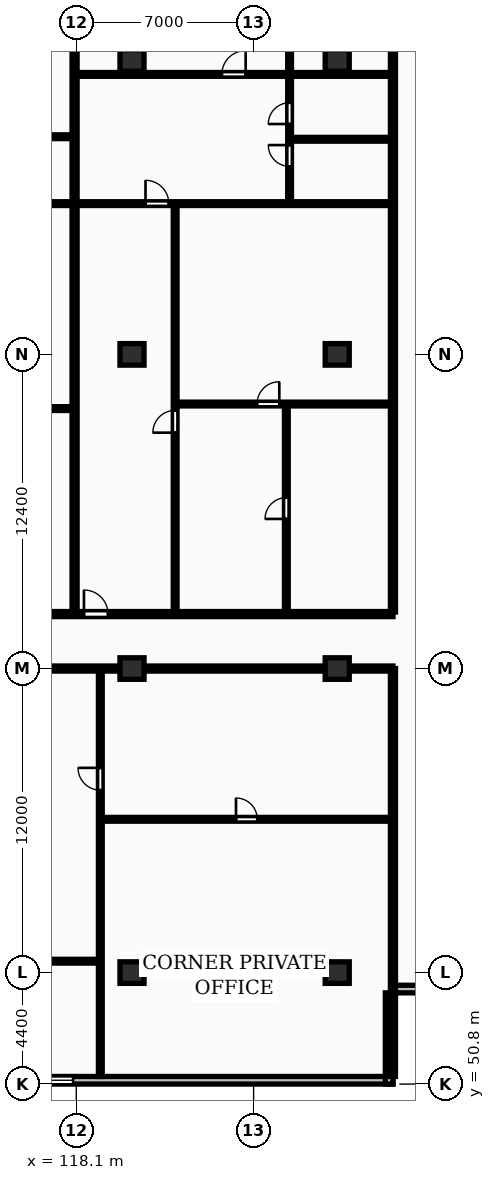
"""IFC4 building model, lengths in metres.
Left out: names, types, materials, properties, quantities, classifications, styles, units other than length and angle.
Written with IfcOpenShell. Run it as: python <this file> out.ifc"""

import sys

from ifc_helpers import new_model, si_unit, direction, frame, frame_2d, origin, origin_2d, place, context, subcontext, project, spatial, rectangle, extrude, element, fill, save


model = new_model("IFC4")
c1 = context("Model", 3, precision=1e-05, world=origin(), true_north=direction((0.0, 1.0)))
c2 = subcontext(c1, "Body", "Model", "MODEL_VIEW")
j1 = project(units=[si_unit("LENGTHUNIT", "METRE"), si_unit("PLANEANGLEUNIT", "RADIAN")], contexts=[c1])
p1 = place(None, origin())
s1 = spatial("IfcSite", under=j1, at=p1, CompositionType="ELEMENT")
p2 = place(p1, origin())
s2 = spatial("IfcBuilding", under=s1, at=p2, CompositionType="ELEMENT")
p3 = place(p2, frame((0.0, 0.0, 87.3)))
s3 = spatial("IfcBuildingStorey", under=s2, at=p3, CompositionType="ELEMENT", Elevation=87.3)
for number, where, z_axis, x_axis in (
    (1, (120.3, 55.2, 0.0), (0.0, 0.0, 1.0), (1.0, 0.0, 0.0)),
    (2, (120.3, 67.2, 0.0), (0.0, 0.0, 1.0), (1.0, 0.0, 0.0)),
    (3, (120.3, 79.6, 0.0), (0.0, 0.0, 1.0), (1.0, 0.0, 0.0)),
    (4, (120.3, 91.2, 0.0), (0.0, 0.0, 1.0), (1.0, 0.0, 0.0)),
    (5, (128.4, 55.2, 0.0), (0.0, 0.0, 1.0), (1.0, 0.0, 0.0)),
    (6, (128.4, 67.2, 0.0), (0.0, 0.0, 1.0), (1.0, 0.0, 0.0)),
    (7, (128.4, 79.6, 0.0), (0.0, 0.0, 1.0), (1.0, 0.0, 0.0)),
    (8, (128.4, 91.2, 0.0), (0.0, 0.0, 1.0), (1.0, 0.0, 0.0)),
):
    element("IfcColumn", number, at=place(p3, frame(where, z_axis=z_axis, x_axis=x_axis)), inside=s3, PredefinedType="COLUMN", context=c2, shape_type="SweptSolid", body=[
        extrude(rectangle(XDim=0.95, YDim=0.85, at=origin_2d()), origin(), (0.0, 0.0, 1.0), 3.25),
    ])
p4 = place(p3, frame((57.6, 50.95, 0.0), z_axis=(0.0, 0.0, 1.0), x_axis=(1.0, 0.0, 0.0)))
e9 = element("IfcWall", 9, at=p4, inside=s3, PredefinedType="STANDARD", context=c2, shape_type="SweptSolid", body=[
    extrude(rectangle(XDim=73.0, YDim=0.3, at=frame_2d((36.5, 0.0))), origin(), (0.0, 0.0, 1.0), 2.97),
])
p5 = place(p4, frame((15.225, 0.0, 0.85)))
e10 = element("IfcOpeningElement", 10, at=p5, cuts=e9, PredefinedType="OPENING", context=c2, shape_type="SweptSolid", body=[
    extrude(rectangle(XDim=1.8, YDim=1.8, at=frame_2d((0.9, 0.9))), frame((0.0, 0.16, 0.0), z_axis=(0.0, -1.0, 0.0), x_axis=(1.0, 0.0, 0.0)), (0.0, 0.0, 1.0), 0.32),
])
p6 = place(p4, frame((58.575, 0.0, 0.85)))
e11 = element("IfcOpeningElement", 11, at=p6, cuts=e9, PredefinedType="OPENING", context=c2, shape_type="SweptSolid", body=[
    extrude(rectangle(XDim=1.8, YDim=1.8, at=frame_2d((0.9, 0.9))), frame((0.0, 0.16, 0.0), z_axis=(0.0, -1.0, 0.0), x_axis=(1.0, 0.0, 0.0)), (0.0, 0.0, 1.0), 0.32),
])
for number, where, z_axis, x_axis in (
    (12, (130.45, 50.8, 0.0), (0.0, 0.0, 1.0), (0.0, 1.0, 0.0)),
    (13, (130.6, 54.55, 0.0), (0.0, 0.0, 1.0), (1.0, 0.0, 0.0)),
):
    element("IfcWall", number, at=place(p3, frame(where, z_axis=z_axis, x_axis=x_axis)), inside=s3, PredefinedType="STANDARD", context=c2, shape_type="SweptSolid", body=[
        extrude(rectangle(XDim=3.6, YDim=0.3, at=frame_2d((1.8, 0.0))), origin(), (0.0, 0.0, 1.0), 2.97),
    ])
p7 = place(p3, frame((130.6, 51.1, 0.0), z_axis=(0.0, 0.0, 1.0), x_axis=(0.0, 1.0, 0.0)))
e14 = element("IfcWall", 14, at=p7, inside=s3, PredefinedType="PARTITIONING", context=c2, shape_type="SweptSolid", body=[
    extrude(rectangle(XDim=16.1, YDim=0.2, at=frame_2d((8.05, 0.0))), origin(), (0.0, 0.0, 1.0), 2.97),
])
p8 = place(p3, frame((119.05, 61.25, 0.0), z_axis=(0.0, 0.0, 1.0), x_axis=(1.0, 0.0, 0.0)))
e15 = element("IfcWall", 15, at=p8, inside=s3, PredefinedType="PARTITIONING", context=c2, shape_type="SweptSolid", body=[
    extrude(rectangle(XDim=11.55, YDim=0.15, at=frame_2d((5.775, 0.0))), origin(), (0.0, 0.0, 1.0), 2.97),
])
p9 = place(p8, frame((5.355, 0.0, 0.0)))
e16 = element("IfcOpeningElement", 16, at=p9, cuts=e15, PredefinedType="OPENING", context=c2, shape_type="SweptSolid", body=[
    extrude(rectangle(XDim=0.84, YDim=2.04, at=frame_2d((0.42, 1.02))), frame((0.0, 0.085, 0.0), z_axis=(0.0, -1.0, 0.0), x_axis=(1.0, 0.0, 0.0)), (0.0, 0.0, 1.0), 0.17),
])
p10 = place(p3, frame((119.05, 51.1, 0.0), z_axis=(0.0, 0.0, 1.0), x_axis=(0.0, 1.0, 0.0)))
e17 = element("IfcWall", 17, at=p10, inside=s3, PredefinedType="PARTITIONING", context=c2, shape_type="SweptSolid", body=[
    extrude(rectangle(XDim=16.05, YDim=0.15, at=frame_2d((8.025, 0.0))), origin(), (0.0, 0.0, 1.0), 2.97),
])
p11 = place(p10, frame((11.3, 0.0, 0.0)))
e18 = element("IfcOpeningElement", 18, at=p11, cuts=e17, PredefinedType="OPENING", context=c2, shape_type="SweptSolid", body=[
    extrude(rectangle(XDim=0.88, YDim=2.06, at=frame_2d((0.44, 1.03))), frame((0.0, 0.085, 0.0), z_axis=(0.0, -1.0, 0.0), x_axis=(1.0, 0.0, 0.0)), (0.0, 0.0, 1.0), 0.17),
])
p12 = place(p3, frame((112.27, 55.65, 0.0), z_axis=(0.0, 0.0, 1.0), x_axis=(1.0, 0.0, 0.0)))
e19 = element("IfcWall", 19, at=p12, inside=s3, PredefinedType="PARTITIONING", context=c2, shape_type="SweptSolid", body=[
    extrude(rectangle(XDim=6.76, YDim=0.15, at=frame_2d((3.38, 0.0))), origin(), (0.0, 0.0, 1.0), 2.97),
])
p13 = place(p12, frame((1.64, 0.0, 0.0)))
e20 = element("IfcOpeningElement", 20, at=p13, cuts=e19, PredefinedType="OPENING", context=c2, shape_type="SweptSolid", body=[
    extrude(rectangle(XDim=0.84, YDim=2.04, at=frame_2d((0.42, 1.02))), frame((0.0, 0.085, 0.0), z_axis=(0.0, -1.0, 0.0), x_axis=(1.0, 0.0, 0.0)), (0.0, 0.0, 1.0), 0.17),
])
p14 = place(p12, frame((3.16, 0.0, 0.0)))
e21 = element("IfcOpeningElement", 21, at=p14, cuts=e19, PredefinedType="OPENING", context=c2, shape_type="SweptSolid", body=[
    extrude(rectangle(XDim=0.88, YDim=2.06, at=frame_2d((0.44, 1.03))), frame((0.0, 0.085, 0.0), z_axis=(0.0, -1.0, 0.0), x_axis=(1.0, 0.0, 0.0)), (0.0, 0.0, 1.0), 0.17),
])
p15 = place(p3, frame((112.25, 67.2, 0.0), z_axis=(0.0, 0.0, 1.0), x_axis=(1.0, 0.0, 0.0)))
e22 = element("IfcWall", 22, at=p15, inside=s3, PredefinedType="PARTITIONING", context=c2, shape_type="SweptSolid", body=[
    extrude(rectangle(XDim=18.35, YDim=0.2, at=frame_2d((9.175, 0.0))), origin(), (0.0, 0.0, 1.0), 2.433),
])
p16 = place(p15, frame((1.58, 0.0, 0.0)))
e23 = element("IfcOpeningElement", 23, at=p16, cuts=e22, PredefinedType="OPENING", context=c2, shape_type="SweptSolid", body=[
    extrude(rectangle(XDim=0.95, YDim=2.15, at=frame_2d((0.475, 1.075))), frame((0.0, 0.11, 0.0), z_axis=(0.0, -1.0, 0.0), x_axis=(1.0, 0.0, 0.0)), (0.0, 0.0, 1.0), 0.22),
])
for number, where, z_axis, x_axis in (
    (24, (130.6, 69.43, 0.0), (0.0, 0.0, 1.0), (0.0, 1.0, 0.0)),
    (25, (118.033, 69.43, 0.0), (0.0, 0.0, 1.0), (0.0, 1.0, 0.0)),
):
    element("IfcWall", number, at=place(p3, frame(where, z_axis=z_axis, x_axis=x_axis)), inside=s3, PredefinedType="PARTITIONING", context=c2, shape_type="SweptSolid", body=[
        extrude(rectangle(XDim=26.47, YDim=0.2, at=frame_2d((13.235, 0.0))), origin(), (0.0, 0.0, 1.0), 2.97),
    ])
p17 = place(p3, frame((105.017, 77.46, 0.0), z_axis=(0.0, 0.0, 1.0), x_axis=(1.0, 0.0, 0.0)))
e26 = element("IfcWall", 26, at=p17, inside=s3, PredefinedType="PARTITIONING", context=c2, shape_type="SweptSolid", body=[
    extrude(rectangle(XDim=12.936, YDim=0.15, at=frame_2d((6.468, 0.0))), origin(), (0.0, 0.0, 1.0), 2.97),
])
p18 = place(p17, frame((4.464, 0.0, 0.0)))
e27 = element("IfcOpeningElement", 27, at=p18, cuts=e26, PredefinedType="OPENING", context=c2, shape_type="SweptSolid", body=[
    extrude(rectangle(XDim=0.88, YDim=2.06, at=frame_2d((0.44, 1.03))), frame((0.0, 0.085, 0.0), z_axis=(0.0, -1.0, 0.0), x_axis=(1.0, 0.0, 0.0)), (0.0, 0.0, 1.0), 0.17),
])
p19 = place(p3, frame((106.027, 88.19, 0.0), z_axis=(0.0, 0.0, 1.0), x_axis=(1.0, 0.0, 0.0)))
e28 = element("IfcWall", 28, at=p19, inside=s3, PredefinedType="PARTITIONING", context=c2, shape_type="SweptSolid", body=[
    extrude(rectangle(XDim=11.926, YDim=0.15, at=frame_2d((5.963, 0.0))), origin(), (0.0, 0.0, 1.0), 2.97),
])
p20 = place(p19, frame((1.05, 0.0, 0.0)))
e29 = element("IfcOpeningElement", 29, at=p20, cuts=e28, PredefinedType="OPENING", context=c2, shape_type="SweptSolid", body=[
    extrude(rectangle(XDim=0.84, YDim=2.04, at=frame_2d((0.42, 1.02))), frame((0.0, 0.085, 0.0), z_axis=(0.0, -1.0, 0.0), x_axis=(1.0, 0.0, 0.0)), (0.0, 0.0, 1.0), 0.17),
])
p21 = place(p19, frame((5.543, 0.0, 0.0)))
e30 = element("IfcOpeningElement", 30, at=p21, cuts=e28, PredefinedType="OPENING", context=c2, shape_type="SweptSolid", body=[
    extrude(rectangle(XDim=0.84, YDim=2.04, at=frame_2d((0.42, 1.02))), frame((0.0, 0.085, 0.0), z_axis=(0.0, -1.0, 0.0), x_axis=(1.0, 0.0, 0.0)), (0.0, 0.0, 1.0), 0.17),
])
p22 = place(p19, frame((8.203, 0.0, 0.0)))
e31 = element("IfcOpeningElement", 31, at=p22, cuts=e28, PredefinedType="OPENING", context=c2, shape_type="SweptSolid", body=[
    extrude(rectangle(XDim=0.84, YDim=2.04, at=frame_2d((0.42, 1.02))), frame((0.0, 0.085, 0.0), z_axis=(0.0, -1.0, 0.0), x_axis=(1.0, 0.0, 0.0)), (0.0, 0.0, 1.0), 0.17),
])
p23 = place(p3, frame((101.067, 85.55, 0.0), z_axis=(0.0, 0.0, 1.0), x_axis=(1.0, 0.0, 0.0)))
e32 = element("IfcWall", 32, at=p23, inside=s3, PredefinedType="PARTITIONING", context=c2, shape_type="SweptSolid", body=[
    extrude(rectangle(XDim=16.886, YDim=0.15, at=frame_2d((8.443, 0.0))), origin(), (0.0, 0.0, 1.0), 2.97),
])
p24 = place(p23, frame((2.72, 0.0, 0.0)))
e33 = element("IfcOpeningElement", 33, at=p24, cuts=e32, PredefinedType="OPENING", context=c2, shape_type="SweptSolid", body=[
    extrude(rectangle(XDim=0.92, YDim=2.08, at=frame_2d((0.46, 1.04))), frame((0.0, 0.085, 0.0), z_axis=(0.0, -1.0, 0.0), x_axis=(1.0, 0.0, 0.0)), (0.0, 0.0, 1.0), 0.17),
])
p25 = place(p3, frame((126.392, 69.41, 0.0), z_axis=(0.0, 0.0, 1.0), x_axis=(0.0, 1.0, 0.0)))
e34 = element("IfcWall", 34, at=p25, inside=s3, PredefinedType="PARTITIONING", context=c2, shape_type="SweptSolid", body=[
    extrude(rectangle(XDim=8.23, YDim=0.15, at=frame_2d((4.115, 0.0))), origin(), (0.0, 0.0, 1.0), 2.97),
])
p26 = place(p25, frame((3.695, 0.0, 0.0)))
e35 = element("IfcOpeningElement", 35, at=p26, cuts=e34, PredefinedType="OPENING", context=c2, shape_type="SweptSolid", body=[
    extrude(rectangle(XDim=0.84, YDim=2.04, at=frame_2d((0.42, 1.02))), frame((0.0, 0.085, 0.0), z_axis=(0.0, -1.0, 0.0), x_axis=(1.0, 0.0, 0.0)), (0.0, 0.0, 1.0), 0.17),
])
p27 = place(p3, frame((122.063, 77.64, 0.0), z_axis=(0.0, 0.0, 1.0), x_axis=(1.0, 0.0, 0.0)))
e36 = element("IfcWall", 36, at=p27, inside=s3, PredefinedType="PARTITIONING", context=c2, shape_type="SweptSolid", body=[
    extrude(rectangle(XDim=8.457, YDim=0.15, at=frame_2d((4.228, 0.0))), origin(), (0.0, 0.0, 1.0), 2.97),
])
p28 = place(p27, frame((3.171, 0.0, 0.0)))
e37 = element("IfcOpeningElement", 37, at=p28, cuts=e36, PredefinedType="OPENING", context=c2, shape_type="SweptSolid", body=[
    extrude(rectangle(XDim=0.88, YDim=2.06, at=frame_2d((0.44, 1.03))), frame((0.0, 0.085, 0.0), z_axis=(0.0, -1.0, 0.0), x_axis=(1.0, 0.0, 0.0)), (0.0, 0.0, 1.0), 0.17),
])
p29 = place(p3, frame((122.003, 69.41, 0.0), z_axis=(0.0, 0.0, 1.0), x_axis=(0.0, 1.0, 0.0)))
e38 = element("IfcWall", 38, at=p29, inside=s3, PredefinedType="PARTITIONING", context=c2, shape_type="SweptSolid", body=[
    extrude(rectangle(XDim=16.1, YDim=0.15, at=frame_2d((8.05, 0.0))), origin(), (0.0, 0.0, 1.0), 2.97),
])
p30 = place(p29, frame((7.1, 0.0, 0.0)))
e39 = element("IfcOpeningElement", 39, at=p30, cuts=e38, PredefinedType="OPENING", context=c2, shape_type="SweptSolid", body=[
    extrude(rectangle(XDim=0.88, YDim=2.06, at=frame_2d((0.44, 1.03))), frame((0.0, 0.085, 0.0), z_axis=(0.0, -1.0, 0.0), x_axis=(1.0, 0.0, 0.0)), (0.0, 0.0, 1.0), 0.17),
])
p31 = place(p3, frame((126.58, 88.09, 0.0), z_axis=(0.0, 0.0, 1.0), x_axis=(1.0, 0.0, 0.0)))
e40 = element("IfcWall", 40, at=p31, inside=s3, PredefinedType="PARTITIONING", context=c2, shape_type="SweptSolid", body=[
    extrude(rectangle(XDim=3.94, YDim=0.15, at=frame_2d((1.97, 0.0))), origin(), (0.0, 0.0, 1.0), 2.97),
])
p32 = place(p3, frame((126.52, 85.59, 0.0), z_axis=(0.0, 0.0, 1.0), x_axis=(0.0, 1.0, 0.0)))
e41 = element("IfcWall", 41, at=p32, inside=s3, PredefinedType="PARTITIONING", context=c2, shape_type="SweptSolid", body=[
    extrude(rectangle(XDim=10.31, YDim=0.15, at=frame_2d((5.155, 0.0))), origin(), (0.0, 0.0, 1.0), 2.97),
])
p33 = place(p32, frame((1.43, 0.0, 0.0)))
e42 = element("IfcOpeningElement", 42, at=p33, cuts=e41, PredefinedType="OPENING", context=c2, shape_type="SweptSolid", body=[
    extrude(rectangle(XDim=0.84, YDim=2.04, at=frame_2d((0.42, 1.02))), frame((0.0, 0.085, 0.0), z_axis=(0.0, -1.0, 0.0), x_axis=(1.0, 0.0, 0.0)), (0.0, 0.0, 1.0), 0.17),
])
p34 = place(p32, frame((3.102, 0.0, 0.0)))
e43 = element("IfcOpeningElement", 43, at=p34, cuts=e41, PredefinedType="OPENING", context=c2, shape_type="SweptSolid", body=[
    extrude(rectangle(XDim=0.84, YDim=2.04, at=frame_2d((0.42, 1.02))), frame((0.0, 0.085, 0.0), z_axis=(0.0, -1.0, 0.0), x_axis=(1.0, 0.0, 0.0)), (0.0, 0.0, 1.0), 0.17),
])
p35 = place(p32, frame((7.29, 0.0, 0.0)))
e44 = element("IfcOpeningElement", 44, at=p35, cuts=e41, PredefinedType="OPENING", context=c2, shape_type="SweptSolid", body=[
    extrude(rectangle(XDim=0.88, YDim=2.06, at=frame_2d((0.44, 1.03))), frame((0.0, 0.085, 0.0), z_axis=(0.0, -1.0, 0.0), x_axis=(1.0, 0.0, 0.0)), (0.0, 0.0, 1.0), 0.17),
])
p36 = place(p3, frame((118.113, 85.55, 0.0), z_axis=(0.0, 0.0, 1.0), x_axis=(1.0, 0.0, 0.0)))
e45 = element("IfcWall", 45, at=p36, inside=s3, PredefinedType="PARTITIONING", context=c2, shape_type="SweptSolid", body=[
    extrude(rectangle(XDim=12.407, YDim=0.15, at=frame_2d((6.203, 0.0))), origin(), (0.0, 0.0, 1.0), 2.97),
])
p37 = place(p36, frame((2.72, 0.0, 0.0)))
e46 = element("IfcOpeningElement", 46, at=p37, cuts=e45, PredefinedType="OPENING", context=c2, shape_type="SweptSolid", body=[
    extrude(rectangle(XDim=0.92, YDim=2.08, at=frame_2d((0.46, 1.04))), frame((0.0, 0.085, 0.0), z_axis=(0.0, -1.0, 0.0), x_axis=(1.0, 0.0, 0.0)), (0.0, 0.0, 1.0), 0.17),
])
p38 = place(p3, frame((118.113, 90.65, 0.0), z_axis=(0.0, 0.0, 1.0), x_axis=(1.0, 0.0, 0.0)))
e47 = element("IfcWall", 47, at=p38, inside=s3, PredefinedType="PARTITIONING", context=c2, shape_type="SweptSolid", body=[
    extrude(rectangle(XDim=12.407, YDim=0.15, at=frame_2d((6.203, 0.0))), origin(), (0.0, 0.0, 1.0), 2.97),
])
p39 = place(p38, frame((5.733, 0.0, 0.0)))
e48 = element("IfcOpeningElement", 48, at=p39, cuts=e47, PredefinedType="OPENING", context=c2, shape_type="SweptSolid", body=[
    extrude(rectangle(XDim=0.94, YDim=2.1, at=frame_2d((0.47, 1.05))), frame((0.0, 0.085, 0.0), z_axis=(0.0, -1.0, 0.0), x_axis=(1.0, 0.0, 0.0)), (0.0, 0.0, 1.0), 0.17),
])
p40 = place(p3, frame((57.6, 69.35, 0.0), z_axis=(0.0, 0.0, 1.0), x_axis=(1.0, 0.0, 0.0)))
e49 = element("IfcWall", 49, at=p40, inside=s3, PredefinedType="PARTITIONING", context=c2, shape_type="SweptSolid", body=[
    extrude(rectangle(XDim=73.0, YDim=0.2, at=frame_2d((36.5, 0.0))), origin(), (0.0, 0.0, 1.0), 2.97),
])
p41 = place(p40, frame((0.37, 0.0, 0.0)))
e50 = element("IfcOpeningElement", 50, at=p41, cuts=e49, PredefinedType="OPENING", context=c2, shape_type="SweptSolid", body=[
    extrude(rectangle(XDim=0.95, YDim=2.15, at=frame_2d((0.475, 1.075))), frame((0.0, 0.11, 0.0), z_axis=(0.0, -1.0, 0.0), x_axis=(1.0, 0.0, 0.0)), (0.0, 0.0, 1.0), 0.22),
])
p42 = place(p40, frame((20.421, 0.0, 0.0)))
e51 = element("IfcOpeningElement", 51, at=p42, cuts=e49, PredefinedType="OPENING", context=c2, shape_type="SweptSolid", body=[
    extrude(rectangle(XDim=1.22, YDim=2.18, at=frame_2d((0.61, 1.09))), frame((0.0, 0.11, 0.0), z_axis=(0.0, -1.0, 0.0), x_axis=(1.0, 0.0, 0.0)), (0.0, 0.0, 1.0), 0.22),
])
p43 = place(p40, frame((32.729, 0.0, 0.0)))
e52 = element("IfcOpeningElement", 52, at=p43, cuts=e49, PredefinedType="OPENING", context=c2, shape_type="SweptSolid", body=[
    extrude(rectangle(XDim=0.95, YDim=2.15, at=frame_2d((0.475, 1.075))), frame((0.0, 0.11, 0.0), z_axis=(0.0, -1.0, 0.0), x_axis=(1.0, 0.0, 0.0)), (0.0, 0.0, 1.0), 0.22),
])
p44 = place(p40, frame((46.157, 0.0, 0.0)))
e53 = element("IfcOpeningElement", 53, at=p44, cuts=e49, PredefinedType="OPENING", context=c2, shape_type="SweptSolid", body=[
    extrude(rectangle(XDim=0.95, YDim=2.15, at=frame_2d((0.475, 1.075))), frame((0.0, 0.11, 0.0), z_axis=(0.0, -1.0, 0.0), x_axis=(1.0, 0.0, 0.0)), (0.0, 0.0, 1.0), 0.22),
])
p45 = place(p40, frame((60.803, 0.0, 0.0)))
e54 = element("IfcOpeningElement", 54, at=p45, cuts=e49, PredefinedType="OPENING", context=c2, shape_type="SweptSolid", body=[
    extrude(rectangle(XDim=0.95, YDim=2.15, at=frame_2d((0.475, 1.075))), frame((0.0, 0.11, 0.0), z_axis=(0.0, -1.0, 0.0), x_axis=(1.0, 0.0, 0.0)), (0.0, 0.0, 1.0), 0.22),
])
p46 = place(p6, origin())
e55 = element("IfcWindow", 55, at=p46, inside=s3, PartitioningType="SINGLE_PANEL", PredefinedType="WINDOW", context=c2, shape_type="SweptSolid", body=[
    extrude(rectangle(XDim=1.8, YDim=1.8, at=frame_2d((0.9, 0.9))), frame((0.0, 0.03, 0.0), z_axis=(0.0, -1.0, 0.0), x_axis=(1.0, 0.0, 0.0)), (0.0, 0.0, 1.0), 0.06),
])
fill(e11, e55)
p47 = place(p9, origin())
e56 = element("IfcDoor", 56, at=p47, inside=s3, OperationType="SINGLE_SWING_LEFT", PredefinedType="DOOR", context=c2, shape_type="SweptSolid", body=[
    extrude(rectangle(XDim=0.84, YDim=2.04, at=frame_2d((0.42, 1.02))), frame((0.0, 0.025, 0.0), z_axis=(0.0, -1.0, 0.0), x_axis=(1.0, 0.0, 0.0)), (0.0, 0.0, 1.0), 0.05),
])
fill(e16, e56)
p48 = place(p11, origin())
e57 = element("IfcDoor", 57, at=p48, inside=s3, OperationType="SINGLE_SWING_RIGHT", PredefinedType="DOOR", context=c2, shape_type="SweptSolid", body=[
    extrude(rectangle(XDim=0.88, YDim=2.06, at=frame_2d((0.44, 1.03))), frame((0.0, 0.025, 0.0), z_axis=(0.0, -1.0, 0.0), x_axis=(1.0, 0.0, 0.0)), (0.0, 0.0, 1.0), 0.05),
])
fill(e18, e57)
p49 = place(p26, origin())
e58 = element("IfcDoor", 58, at=p49, inside=s3, OperationType="SINGLE_SWING_LEFT", PredefinedType="DOOR", context=c2, shape_type="SweptSolid", body=[
    extrude(rectangle(XDim=0.84, YDim=2.04, at=frame_2d((0.42, 1.02))), frame((0.0, 0.025, 0.0), z_axis=(0.0, -1.0, 0.0), x_axis=(1.0, 0.0, 0.0)), (0.0, 0.0, 1.0), 0.05),
])
fill(e35, e58)
p50 = place(p28, origin())
e59 = element("IfcDoor", 59, at=p50, inside=s3, OperationType="SINGLE_SWING_RIGHT", PredefinedType="DOOR", context=c2, shape_type="SweptSolid", body=[
    extrude(rectangle(XDim=0.88, YDim=2.06, at=frame_2d((0.44, 1.03))), frame((0.0, 0.025, 0.0), z_axis=(0.0, -1.0, 0.0), x_axis=(1.0, 0.0, 0.0)), (0.0, 0.0, 1.0), 0.05),
])
fill(e37, e59)
p51 = place(p30, origin())
e60 = element("IfcDoor", 60, at=p51, inside=s3, OperationType="SINGLE_SWING_LEFT", PredefinedType="DOOR", context=c2, shape_type="SweptSolid", body=[
    extrude(rectangle(XDim=0.88, YDim=2.06, at=frame_2d((0.44, 1.03))), frame((0.0, 0.025, 0.0), z_axis=(0.0, -1.0, 0.0), x_axis=(1.0, 0.0, 0.0)), (0.0, 0.0, 1.0), 0.05),
])
fill(e39, e60)
p52 = place(p33, origin())
e61 = element("IfcDoor", 61, at=p52, inside=s3, OperationType="SINGLE_SWING_RIGHT", PredefinedType="DOOR", context=c2, shape_type="SweptSolid", body=[
    extrude(rectangle(XDim=0.84, YDim=2.04, at=frame_2d((0.42, 1.02))), frame((0.0, 0.025, 0.0), z_axis=(0.0, -1.0, 0.0), x_axis=(1.0, 0.0, 0.0)), (0.0, 0.0, 1.0), 0.05),
])
fill(e42, e61)
p53 = place(p34, origin())
e62 = element("IfcDoor", 62, at=p53, inside=s3, OperationType="SINGLE_SWING_LEFT", PredefinedType="DOOR", context=c2, shape_type="SweptSolid", body=[
    extrude(rectangle(XDim=0.84, YDim=2.04, at=frame_2d((0.42, 1.02))), frame((0.0, 0.025, 0.0), z_axis=(0.0, -1.0, 0.0), x_axis=(1.0, 0.0, 0.0)), (0.0, 0.0, 1.0), 0.05),
])
fill(e43, e62)
p54 = place(p37, origin())
e63 = element("IfcDoor", 63, at=p54, inside=s3, OperationType="SINGLE_SWING_LEFT", PredefinedType="DOOR", context=c2, shape_type="SweptSolid", body=[
    extrude(rectangle(XDim=0.92, YDim=2.08, at=frame_2d((0.46, 1.04))), frame((0.0, 0.025, 0.0), z_axis=(0.0, -1.0, 0.0), x_axis=(1.0, 0.0, 0.0)), (0.0, 0.0, 1.0), 0.05),
])
fill(e46, e63)
p55 = place(p39, origin())
e64 = element("IfcDoor", 64, at=p55, inside=s3, OperationType="SINGLE_SWING_RIGHT", PredefinedType="DOOR", context=c2, shape_type="SweptSolid", body=[
    extrude(rectangle(XDim=0.94, YDim=2.1, at=frame_2d((0.47, 1.05))), frame((0.0, 0.025, 0.0), z_axis=(0.0, -1.0, 0.0), x_axis=(1.0, 0.0, 0.0)), (0.0, 0.0, 1.0), 0.05),
])
fill(e48, e64)
p56 = place(p45, origin())
e65 = element("IfcDoor", 65, at=p56, inside=s3, OperationType="SINGLE_SWING_LEFT", PredefinedType="DOOR", context=c2, shape_type="SweptSolid", body=[
    extrude(rectangle(XDim=0.95, YDim=2.15, at=frame_2d((0.475, 1.075))), frame((0.0, 0.025, 0.0), z_axis=(0.0, -1.0, 0.0), x_axis=(1.0, 0.0, 0.0)), (0.0, 0.0, 1.0), 0.05),
])
fill(e54, e65)
save(model, sys.argv[1])
